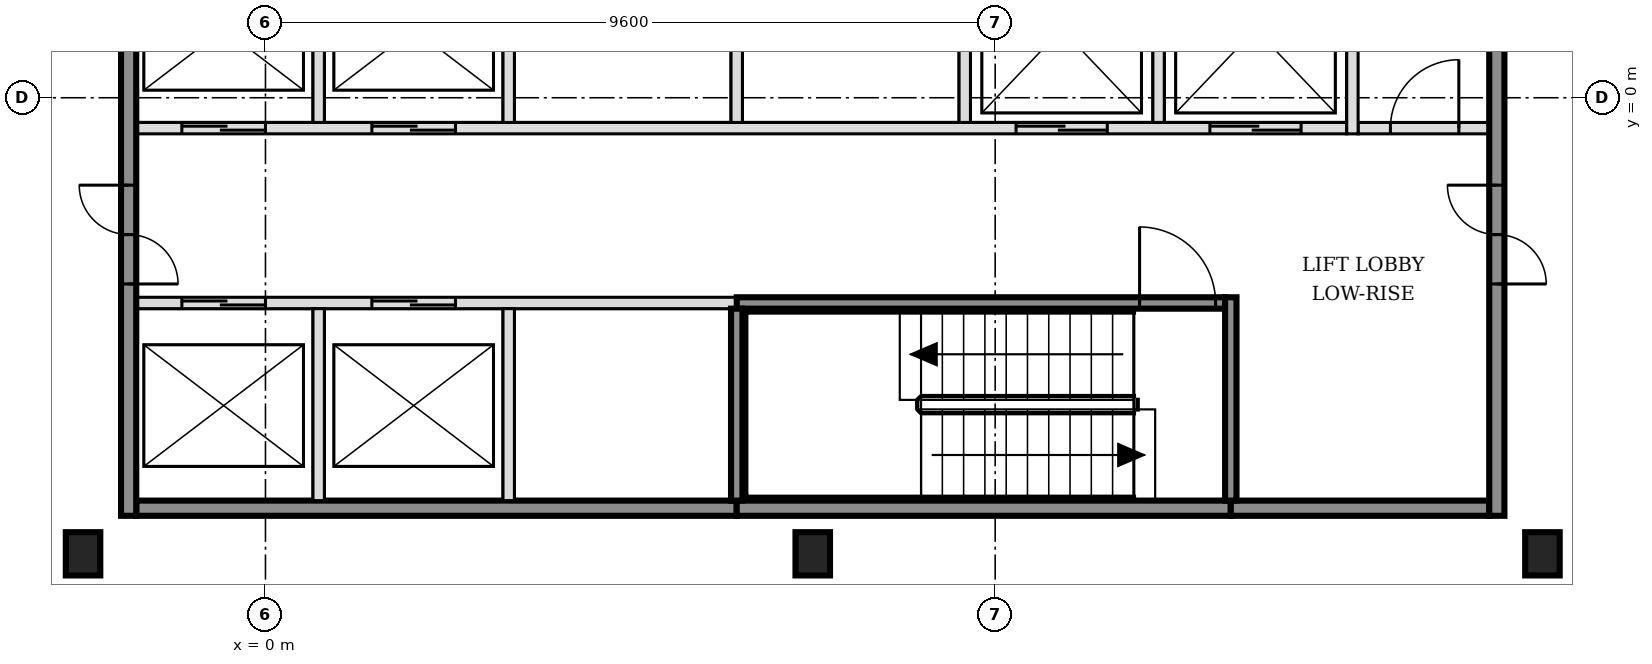
"""IFC4 building model, lengths in metres.
Left out: names, types, materials, properties, quantities, classifications, styles, units other than length and angle.
Written with IfcOpenShell. Run it as: python <this file> out.ifc"""

import sys

from ifc_helpers import new_model, si_unit, direction, frame, frame_2d, origin, origin_2d, place, context, subcontext, project, spatial, rectangle, i_section, extrude, element, fill, save


model = new_model("IFC4")
c1 = context("Model", 3, precision=1e-05, world=origin(), true_north=direction((0.0, 1.0)))
c2 = subcontext(c1, "Body", "Model", "MODEL_VIEW")
j1 = project(units=[si_unit("LENGTHUNIT", "METRE"), si_unit("PLANEANGLEUNIT", "RADIAN")], contexts=[c1])
p1 = place(None, origin())
s1 = spatial("IfcSite", under=j1, at=p1, CompositionType="ELEMENT")
p2 = place(p1, origin())
s2 = spatial("IfcBuilding", under=s1, at=p2, CompositionType="ELEMENT")
p3 = place(p2, frame((0.0, 0.0, 58.2)))
s3 = spatial("IfcBuildingStorey", under=s2, at=p3, CompositionType="ELEMENT", Elevation=58.2)
for number, where, z_axis, x_axis in (
    (1, (-2.4, -6.0, -0.15), (0.0, 0.0, 1.0), (1.0, 0.0, 0.0)),
    (2, (7.2, -6.0, -0.15), (0.0, 0.0, 1.0), (1.0, 0.0, 0.0)),
    (3, (16.8, -6.0, -0.15), (0.0, 0.0, 1.0), (1.0, 0.0, 0.0)),
):
    element("IfcColumn", number, at=place(p3, frame(where, z_axis=z_axis, x_axis=x_axis)), inside=s3, PredefinedType="COLUMN", context=c2, shape_type="SweptSolid", body=[
        extrude(i_section(OverallWidth=0.454, OverallDepth=0.569, WebThickness=0.078, FlangeThickness=0.125, FilletRadius=0.015, at=origin_2d()), origin(), (0.0, 0.0, 1.0), 3.6),
    ])
p4 = place(p3, frame((-1.7, -5.4, 0.0), z_axis=(0.0, 0.0, 1.0), x_axis=(1.0, 0.0, 0.0)))
e4 = element("IfcWall", 4, at=p4, inside=s3, PredefinedType="SOLIDWALL", context=c2, shape_type="SweptSolid", body=[
    extrude(rectangle(XDim=7.9, YDim=0.2, at=frame_2d((3.95, 0.0))), origin(), (0.0, 0.0, 1.0), 3.45),
])
p5 = place(p3, frame((6.2, -5.4, 0.0), z_axis=(0.0, 0.0, 1.0), x_axis=(1.0, 0.0, 0.0)))
e5 = element("IfcWall", 5, at=p5, inside=s3, PredefinedType="SOLIDWALL", context=c2, shape_type="SweptSolid", body=[
    extrude(rectangle(XDim=6.5, YDim=0.2, at=frame_2d((3.25, 0.0))), origin(), (0.0, 0.0, 1.0), 3.45),
])
p6 = place(p3, frame((12.7, -5.4, 0.0), z_axis=(0.0, 0.0, 1.0), x_axis=(1.0, 0.0, 0.0)))
e6 = element("IfcWall", 6, at=p6, inside=s3, PredefinedType="SOLIDWALL", context=c2, shape_type="SweptSolid", body=[
    extrude(rectangle(XDim=3.4, YDim=0.2, at=frame_2d((1.7, 0.0))), origin(), (0.0, 0.0, 1.0), 3.45),
])
p7 = place(p3, frame((-1.7, -2.7, 0.0), z_axis=(0.0, 0.0, 1.0), x_axis=(1.0, 0.0, 0.0)))
e7 = element("IfcWall", 7, at=p7, inside=s3, PredefinedType="SOLIDWALL", context=c2, shape_type="SweptSolid", body=[
    extrude(rectangle(XDim=7.9, YDim=0.15, at=frame_2d((3.95, 0.0))), origin(), (0.0, 0.0, 1.0), 3.45),
])
p8 = place(p7, frame((0.6, 0.0, 0.0)))
e8 = element("IfcOpeningElement", 8, at=p8, cuts=e7, PredefinedType="OPENING", context=c2, shape_type="SweptSolid", body=[
    extrude(rectangle(XDim=1.1, YDim=2.1, at=frame_2d((0.55, 1.05))), frame((0.0, 0.085, 0.0), z_axis=(0.0, -1.0, 0.0), x_axis=(1.0, 0.0, 0.0)), (0.0, 0.0, 1.0), 0.17),
])
p9 = place(p7, frame((3.1, 0.0, 0.0)))
e9 = element("IfcOpeningElement", 9, at=p9, cuts=e7, PredefinedType="OPENING", context=c2, shape_type="SweptSolid", body=[
    extrude(rectangle(XDim=1.1, YDim=2.1, at=frame_2d((0.55, 1.05))), frame((0.0, 0.085, 0.0), z_axis=(0.0, -1.0, 0.0), x_axis=(1.0, 0.0, 0.0)), (0.0, 0.0, 1.0), 0.17),
])
p10 = place(p3, frame((6.2, -2.7, 0.0), z_axis=(0.0, 0.0, 1.0), x_axis=(1.0, 0.0, 0.0)))
e10 = element("IfcWall", 10, at=p10, inside=s3, PredefinedType="SOLIDWALL", context=c2, shape_type="SweptSolid", body=[
    extrude(rectangle(XDim=6.425, YDim=0.15, at=frame_2d((3.212, 0.0))), origin(), (0.0, 0.0, 1.0), 3.45),
])
p11 = place(p10, frame((5.3, 0.0, 0.0)))
e11 = element("IfcOpeningElement", 11, at=p11, cuts=e10, PredefinedType="OPENING", context=c2, shape_type="SweptSolid", body=[
    extrude(rectangle(XDim=1.0, YDim=2.1, at=frame_2d((0.5, 1.05))), frame((0.0, 0.085, 0.0), z_axis=(0.0, -1.0, 0.0), x_axis=(1.0, 0.0, 0.0)), (0.0, 0.0, 1.0), 0.17),
])
p12 = place(p3, frame((-1.7, -0.4, 0.0), z_axis=(0.0, 0.0, 1.0), x_axis=(1.0, 0.0, 0.0)))
e12 = element("IfcWall", 12, at=p12, inside=s3, PredefinedType="SOLIDWALL", context=c2, shape_type="SweptSolid", body=[
    extrude(rectangle(XDim=15.925, YDim=0.15, at=frame_2d((7.962, 0.0))), origin(), (0.0, 0.0, 1.0), 3.45),
])
p13 = place(p12, frame((0.6, 0.0, 0.0)))
e13 = element("IfcOpeningElement", 13, at=p13, cuts=e12, PredefinedType="OPENING", context=c2, shape_type="SweptSolid", body=[
    extrude(rectangle(XDim=1.1, YDim=2.1, at=frame_2d((0.55, 1.05))), frame((0.0, 0.085, 0.0), z_axis=(0.0, -1.0, 0.0), x_axis=(1.0, 0.0, 0.0)), (0.0, 0.0, 1.0), 0.17),
])
p14 = place(p12, frame((3.1, 0.0, 0.0)))
e14 = element("IfcOpeningElement", 14, at=p14, cuts=e12, PredefinedType="OPENING", context=c2, shape_type="SweptSolid", body=[
    extrude(rectangle(XDim=1.1, YDim=2.1, at=frame_2d((0.55, 1.05))), frame((0.0, 0.085, 0.0), z_axis=(0.0, -1.0, 0.0), x_axis=(1.0, 0.0, 0.0)), (0.0, 0.0, 1.0), 0.17),
])
p15 = place(p12, frame((11.575, 0.0, 0.0)))
e15 = element("IfcOpeningElement", 15, at=p15, cuts=e12, PredefinedType="OPENING", context=c2, shape_type="SweptSolid", body=[
    extrude(rectangle(XDim=1.2, YDim=2.1, at=frame_2d((0.6, 1.05))), frame((0.0, 0.085, 0.0), z_axis=(0.0, -1.0, 0.0), x_axis=(1.0, 0.0, 0.0)), (0.0, 0.0, 1.0), 0.17),
])
p16 = place(p12, frame((14.125, 0.0, 0.0)))
e16 = element("IfcOpeningElement", 16, at=p16, cuts=e12, PredefinedType="OPENING", context=c2, shape_type="SweptSolid", body=[
    extrude(rectangle(XDim=1.2, YDim=2.1, at=frame_2d((0.6, 1.05))), frame((0.0, 0.085, 0.0), z_axis=(0.0, -1.0, 0.0), x_axis=(1.0, 0.0, 0.0)), (0.0, 0.0, 1.0), 0.17),
])
p17 = place(p3, frame((14.375, -0.4, 0.0), z_axis=(0.0, 0.0, 1.0), x_axis=(1.0, 0.0, 0.0)))
e17 = element("IfcWall", 17, at=p17, inside=s3, PredefinedType="PARTITIONING", context=c2, shape_type="SweptSolid", body=[
    extrude(rectangle(XDim=1.725, YDim=0.15, at=frame_2d((0.863, 0.0))), origin(), (0.0, 0.0, 1.0), 3.45),
])
p18 = place(p17, frame((0.425, 0.0, 0.0)))
e18 = element("IfcOpeningElement", 18, at=p18, cuts=e17, PredefinedType="OPENING", context=c2, shape_type="SweptSolid", body=[
    extrude(rectangle(XDim=0.9, YDim=2.1, at=frame_2d((0.45, 1.05))), frame((0.0, 0.085, 0.0), z_axis=(0.0, -1.0, 0.0), x_axis=(1.0, 0.0, 0.0)), (0.0, 0.0, 1.0), 0.17),
])
p19 = place(p3, frame((-1.8, -5.5, 0.0), z_axis=(0.0, 0.0, 1.0), x_axis=(0.0, 1.0, 0.0)))
e19 = element("IfcWall", 19, at=p19, inside=s3, PredefinedType="SOLIDWALL", context=c2, shape_type="SweptSolid", body=[
    extrude(rectangle(XDim=15.8, YDim=0.2, at=frame_2d((7.9, 0.0))), origin(), (0.0, 0.0, 1.0), 3.45),
])
p20 = place(p19, frame((3.05, 0.0, 0.0)))
e20 = element("IfcOpeningElement", 20, at=p20, cuts=e19, PredefinedType="OPENING", context=c2, shape_type="SweptSolid", body=[
    extrude(rectangle(XDim=1.3, YDim=2.1, at=frame_2d((0.65, 1.05))), frame((0.0, 0.11, 0.0), z_axis=(0.0, -1.0, 0.0), x_axis=(1.0, 0.0, 0.0)), (0.0, 0.0, 1.0), 0.22),
])
p21 = place(p19, frame((11.45, 0.0, 0.0)))
e21 = element("IfcOpeningElement", 21, at=p21, cuts=e19, PredefinedType="OPENING", context=c2, shape_type="SweptSolid", body=[
    extrude(rectangle(XDim=1.3, YDim=2.1, at=frame_2d((0.65, 1.05))), frame((0.0, 0.11, 0.0), z_axis=(0.0, -1.0, 0.0), x_axis=(1.0, 0.0, 0.0)), (0.0, 0.0, 1.0), 0.22),
])
p22 = place(p3, frame((0.7, -5.3, 0.0), z_axis=(0.0, 0.0, 1.0), x_axis=(0.0, 1.0, 0.0)))
e22 = element("IfcWall", 22, at=p22, inside=s3, PredefinedType="SOLIDWALL", context=c2, shape_type="SweptSolid", body=[
    extrude(rectangle(XDim=2.525, YDim=0.15, at=frame_2d((1.263, 0.0))), origin(), (0.0, 0.0, 1.0), 3.45),
])
p23 = place(p3, frame((0.7, -0.325, 0.0), z_axis=(0.0, 0.0, 1.0), x_axis=(0.0, 1.0, 0.0)))
e23 = element("IfcWall", 23, at=p23, inside=s3, PredefinedType="SOLIDWALL", context=c2, shape_type="SweptSolid", body=[
    extrude(rectangle(XDim=2.45, YDim=0.15, at=frame_2d((1.225, 0.0))), origin(), (0.0, 0.0, 1.0), 3.45),
])
p24 = place(p3, frame((3.2, -5.3, 0.0), z_axis=(0.0, 0.0, 1.0), x_axis=(0.0, 1.0, 0.0)))
e24 = element("IfcWall", 24, at=p24, inside=s3, PredefinedType="SOLIDWALL", context=c2, shape_type="SweptSolid", body=[
    extrude(rectangle(XDim=2.525, YDim=0.15, at=frame_2d((1.263, 0.0))), origin(), (0.0, 0.0, 1.0), 3.45),
])
p25 = place(p3, frame((3.2, -0.325, 0.0), z_axis=(0.0, 0.0, 1.0), x_axis=(0.0, 1.0, 0.0)))
e25 = element("IfcWall", 25, at=p25, inside=s3, PredefinedType="SOLIDWALL", context=c2, shape_type="SweptSolid", body=[
    extrude(rectangle(XDim=2.45, YDim=0.15, at=frame_2d((1.225, 0.0))), origin(), (0.0, 0.0, 1.0), 3.45),
])
p26 = place(p3, frame((6.2, -5.3, 0.0), z_axis=(0.0, 0.0, 1.0), x_axis=(0.0, 1.0, 0.0)))
e26 = element("IfcWall", 26, at=p26, inside=s3, PredefinedType="SOLIDWALL", context=c2, shape_type="SweptSolid", body=[
    extrude(rectangle(XDim=2.525, YDim=0.15, at=frame_2d((1.263, 0.0))), origin(), (0.0, 0.0, 1.0), 3.45),
])
for number, where, z_axis, x_axis in (
    (27, (6.2, -0.325, 0.0), (0.0, 0.0, 1.0), (0.0, 1.0, 0.0)),
    (28, (9.2, -0.325, 0.0), (0.0, 0.0, 1.0), (0.0, 1.0, 0.0)),
    (29, (11.75, -0.325, 0.0), (0.0, 0.0, 1.0), (0.0, 1.0, 0.0)),
):
    element("IfcWall", number, at=place(p3, frame(where, z_axis=z_axis, x_axis=x_axis)), inside=s3, PredefinedType="SOLIDWALL", context=c2, shape_type="SweptSolid", body=[
        extrude(rectangle(XDim=2.45, YDim=0.15, at=frame_2d((1.225, 0.0))), origin(), (0.0, 0.0, 1.0), 3.45),
    ])
p27 = place(p3, frame((12.7, -5.3, 0.0), z_axis=(0.0, 0.0, 1.0), x_axis=(0.0, 1.0, 0.0)))
e30 = element("IfcWall", 30, at=p27, inside=s3, PredefinedType="SOLIDWALL", context=c2, shape_type="SweptSolid", body=[
    extrude(rectangle(XDim=2.675, YDim=0.15, at=frame_2d((1.337, 0.0))), origin(), (0.0, 0.0, 1.0), 3.45),
])
p28 = place(p3, frame((14.3, -0.475, 0.0), z_axis=(0.0, 0.0, 1.0), x_axis=(0.0, 1.0, 0.0)))
e31 = element("IfcWall", 31, at=p28, inside=s3, PredefinedType="SOLIDWALL", context=c2, shape_type="SweptSolid", body=[
    extrude(rectangle(XDim=2.75, YDim=0.15, at=frame_2d((1.375, 0.0))), origin(), (0.0, 0.0, 1.0), 3.45),
])
p29 = place(p3, frame((16.2, -5.5, 0.0), z_axis=(0.0, 0.0, 1.0), x_axis=(0.0, 1.0, 0.0)))
e32 = element("IfcWall", 32, at=p29, inside=s3, PredefinedType="SOLIDWALL", context=c2, shape_type="SweptSolid", body=[
    extrude(rectangle(XDim=15.8, YDim=0.2, at=frame_2d((7.9, 0.0))), origin(), (0.0, 0.0, 1.0), 3.45),
])
p30 = place(p29, frame((3.05, 0.0, 0.0)))
e33 = element("IfcOpeningElement", 33, at=p30, cuts=e32, PredefinedType="OPENING", context=c2, shape_type="SweptSolid", body=[
    extrude(rectangle(XDim=1.3, YDim=2.1, at=frame_2d((0.65, 1.05))), frame((0.0, 0.11, 0.0), z_axis=(0.0, -1.0, 0.0), x_axis=(1.0, 0.0, 0.0)), (0.0, 0.0, 1.0), 0.22),
])
p31 = place(p29, frame((11.45, 0.0, 0.0)))
e34 = element("IfcOpeningElement", 34, at=p31, cuts=e32, PredefinedType="OPENING", context=c2, shape_type="SweptSolid", body=[
    extrude(rectangle(XDim=1.3, YDim=2.1, at=frame_2d((0.65, 1.05))), frame((0.0, 0.11, 0.0), z_axis=(0.0, -1.0, 0.0), x_axis=(1.0, 0.0, 0.0)), (0.0, 0.0, 1.0), 0.22),
])
p32 = place(p8, origin())
e35 = element("IfcDoor", 35, at=p32, inside=s3, OperationType="DOUBLE_DOOR_SLIDING", PredefinedType="DOOR", context=c2, shape_type="SweptSolid", body=[
    extrude(rectangle(XDim=1.1, YDim=2.1, at=frame_2d((0.55, 1.05))), frame((0.0, 0.025, 0.0), z_axis=(0.0, -1.0, 0.0), x_axis=(1.0, 0.0, 0.0)), (0.0, 0.0, 1.0), 0.05),
])
fill(e8, e35)
p33 = place(p9, origin())
e36 = element("IfcDoor", 36, at=p33, inside=s3, OperationType="DOUBLE_DOOR_SLIDING", PredefinedType="DOOR", context=c2, shape_type="SweptSolid", body=[
    extrude(rectangle(XDim=1.1, YDim=2.1, at=frame_2d((0.55, 1.05))), frame((0.0, 0.025, 0.0), z_axis=(0.0, -1.0, 0.0), x_axis=(1.0, 0.0, 0.0)), (0.0, 0.0, 1.0), 0.05),
])
fill(e9, e36)
p34 = place(p13, origin())
e37 = element("IfcDoor", 37, at=p34, inside=s3, OperationType="DOUBLE_DOOR_SLIDING", PredefinedType="DOOR", context=c2, shape_type="SweptSolid", body=[
    extrude(rectangle(XDim=1.1, YDim=2.1, at=frame_2d((0.55, 1.05))), frame((0.0, 0.025, 0.0), z_axis=(0.0, -1.0, 0.0), x_axis=(1.0, 0.0, 0.0)), (0.0, 0.0, 1.0), 0.05),
])
fill(e13, e37)
p35 = place(p14, origin())
e38 = element("IfcDoor", 38, at=p35, inside=s3, OperationType="DOUBLE_DOOR_SLIDING", PredefinedType="DOOR", context=c2, shape_type="SweptSolid", body=[
    extrude(rectangle(XDim=1.1, YDim=2.1, at=frame_2d((0.55, 1.05))), frame((0.0, 0.025, 0.0), z_axis=(0.0, -1.0, 0.0), x_axis=(1.0, 0.0, 0.0)), (0.0, 0.0, 1.0), 0.05),
])
fill(e14, e38)
p36 = place(p15, origin())
e39 = element("IfcDoor", 39, at=p36, inside=s3, OperationType="DOUBLE_DOOR_SLIDING", PredefinedType="DOOR", context=c2, shape_type="SweptSolid", body=[
    extrude(rectangle(XDim=1.2, YDim=2.1, at=frame_2d((0.6, 1.05))), frame((0.0, 0.025, 0.0), z_axis=(0.0, -1.0, 0.0), x_axis=(1.0, 0.0, 0.0)), (0.0, 0.0, 1.0), 0.05),
])
fill(e15, e39)
p37 = place(p16, origin())
e40 = element("IfcDoor", 40, at=p37, inside=s3, OperationType="DOUBLE_DOOR_SLIDING", PredefinedType="DOOR", context=c2, shape_type="SweptSolid", body=[
    extrude(rectangle(XDim=1.2, YDim=2.1, at=frame_2d((0.6, 1.05))), frame((0.0, 0.025, 0.0), z_axis=(0.0, -1.0, 0.0), x_axis=(1.0, 0.0, 0.0)), (0.0, 0.0, 1.0), 0.05),
])
fill(e16, e40)
p38 = place(p11, origin())
e41 = element("IfcDoor", 41, at=p38, inside=s3, OperationType="SINGLE_SWING_LEFT", PredefinedType="DOOR", context=c2, shape_type="SweptSolid", body=[
    extrude(rectangle(XDim=1.0, YDim=2.1, at=frame_2d((0.5, 1.05))), frame((0.0, 0.025, 0.0), z_axis=(0.0, -1.0, 0.0), x_axis=(1.0, 0.0, 0.0)), (0.0, 0.0, 1.0), 0.05),
])
fill(e11, e41)
p39 = place(p20, origin())
e42 = element("IfcDoor", 42, at=p39, inside=s3, OperationType="DOUBLE_DOOR_SINGLE_SWING", PredefinedType="DOOR", context=c2, shape_type="SweptSolid", body=[
    extrude(rectangle(XDim=1.3, YDim=2.1, at=frame_2d((0.65, 1.05))), frame((0.0, 0.025, 0.0), z_axis=(0.0, -1.0, 0.0), x_axis=(1.0, 0.0, 0.0)), (0.0, 0.0, 1.0), 0.05),
])
fill(e20, e42)
p40 = place(p30, origin())
e43 = element("IfcDoor", 43, at=p40, inside=s3, OperationType="DOUBLE_DOOR_SINGLE_SWING", PredefinedType="DOOR", context=c2, shape_type="SweptSolid", body=[
    extrude(rectangle(XDim=1.3, YDim=2.1, at=frame_2d((0.65, 1.05))), frame((0.0, 0.025, 0.0), z_axis=(0.0, -1.0, 0.0), x_axis=(1.0, 0.0, 0.0)), (0.0, 0.0, 1.0), 0.05),
])
fill(e33, e43)
p41 = place(p18, origin())
e44 = element("IfcDoor", 44, at=p41, inside=s3, OperationType="SINGLE_SWING_RIGHT", PredefinedType="DOOR", context=c2, shape_type="SweptSolid", body=[
    extrude(rectangle(XDim=0.9, YDim=2.1, at=frame_2d((0.45, 1.05))), frame((0.0, 0.025, 0.0), z_axis=(0.0, -1.0, 0.0), x_axis=(1.0, 0.0, 0.0)), (0.0, 0.0, 1.0), 0.05),
])
fill(e18, e44)
save(model, sys.argv[1])
